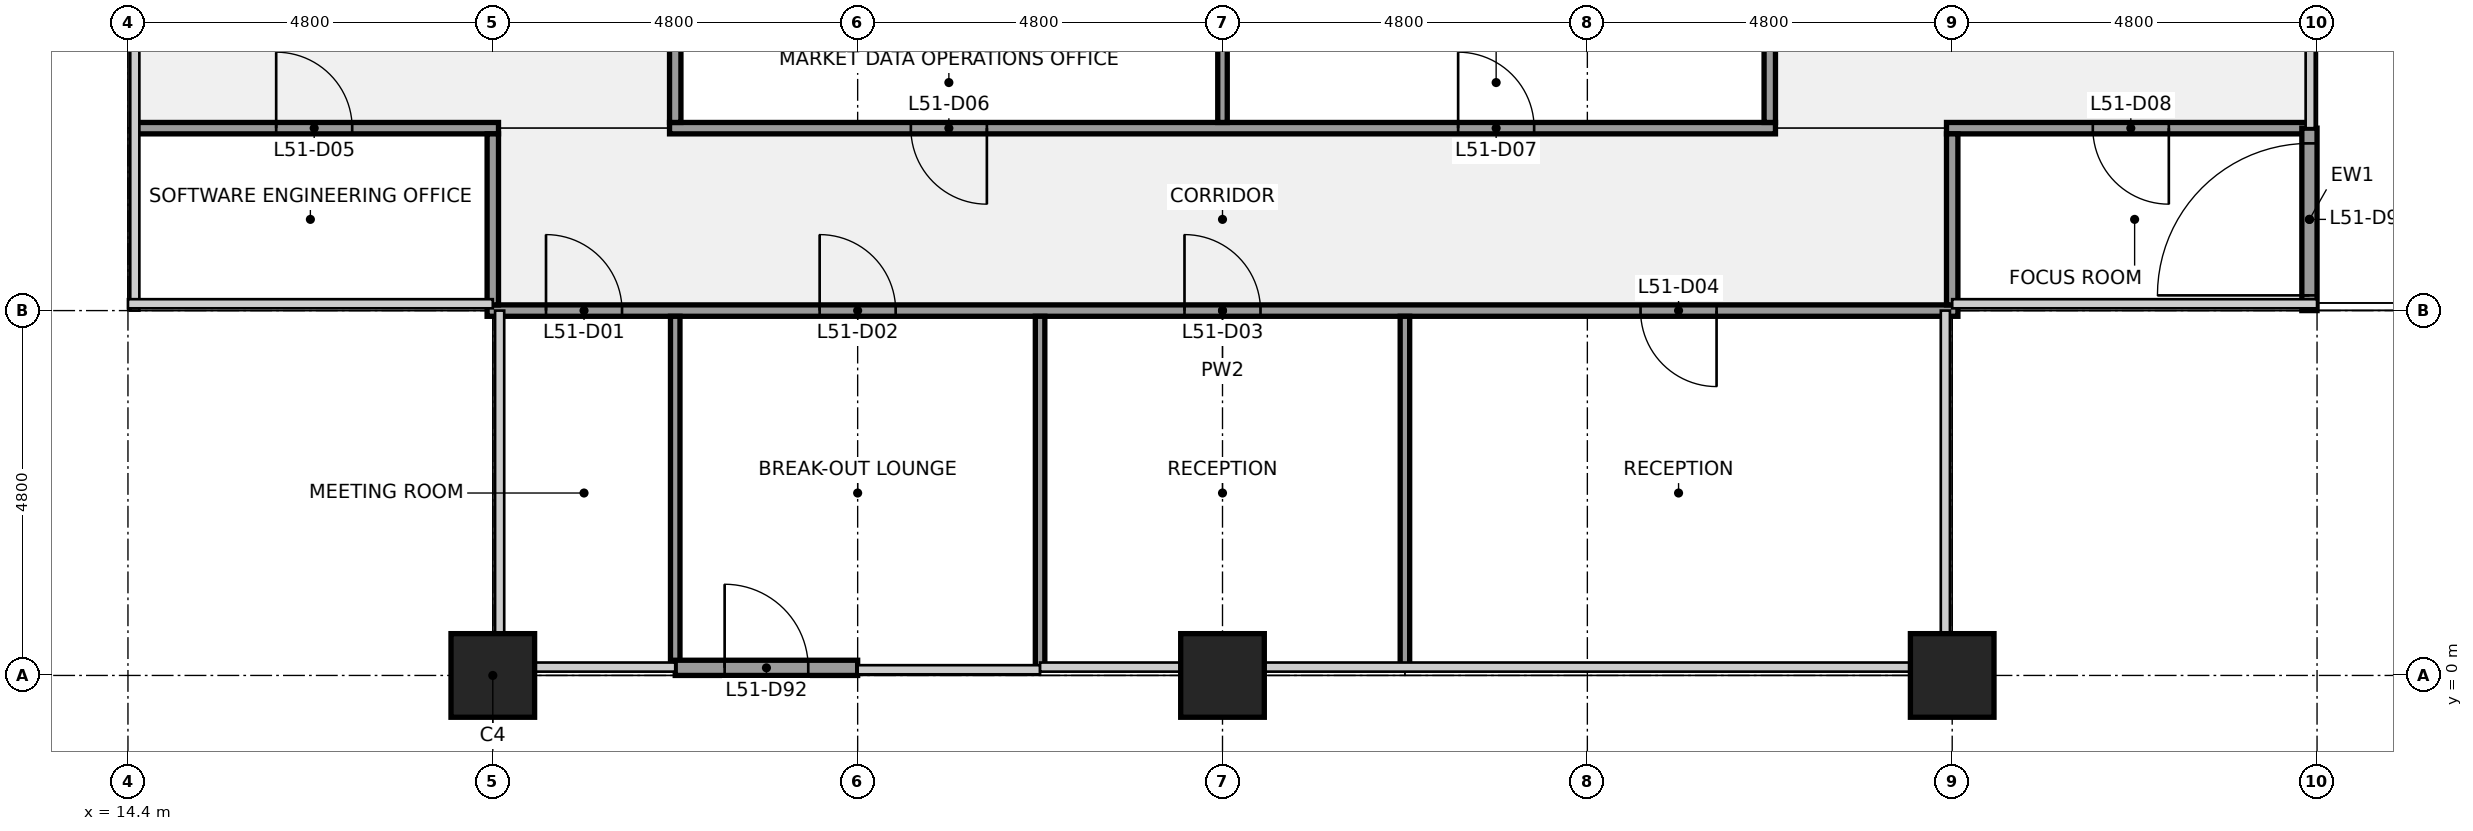
"""IFC4 building model, lengths in metres.
Left out: names, types, materials, properties, quantities, classifications, styles, units other than length and angle.
Written with IfcOpenShell. Run it as: python <this file> out.ifc"""

import sys

from ifc_helpers import new_model, si_unit, direction, frame, frame_2d, origin, origin_2d, place, context, subcontext, project, spatial, rectangle, extrude, element, fill, save


model = new_model("IFC4")
c1 = context("Model", 3, precision=1e-05, world=origin(), true_north=direction((0.0, 1.0)))
c2 = subcontext(c1, "Body", "Model", "MODEL_VIEW")
j1 = project(units=[si_unit("LENGTHUNIT", "METRE"), si_unit("PLANEANGLEUNIT", "RADIAN")], contexts=[c1])
p1 = place(None, origin())
s1 = spatial("IfcSite", under=j1, at=p1, CompositionType="ELEMENT")
p2 = place(p1, origin())
s2 = spatial("IfcBuilding", under=s1, at=p2, CompositionType="ELEMENT")
p3 = place(p2, frame((0.0, 0.0, 233.2)))
s3 = spatial("IfcBuildingStorey", under=s2, at=p3, CompositionType="ELEMENT", Elevation=233.2)
for number, where, z_axis, x_axis in (
    (1, (19.2, 0.0, 0.0), (0.0, 0.0, 1.0), (1.0, 0.0, 0.0)),
    (2, (28.8, 0.0, 0.0), (0.0, 0.0, 1.0), (1.0, 0.0, 0.0)),
    (3, (38.4, 0.0, 0.0), (0.0, 0.0, 1.0), (1.0, 0.0, 0.0)),
):
    element("IfcColumn", number, at=place(p3, frame(where, z_axis=z_axis, x_axis=x_axis)), inside=s3, PredefinedType="COLUMN", context=c2, shape_type="SweptSolid", body=[
        extrude(rectangle(XDim=1.1, YDim=1.1, at=origin_2d()), origin(), (0.0, 0.0, 1.0), 4.0),
    ])
p4 = place(p3, frame((19.125, 4.8, 0.0), z_axis=(0.0, 0.0, 1.0), x_axis=(1.0, 0.0, 0.0)))
e4 = element("IfcWall", 4, at=p4, inside=s3, PredefinedType="PARTITIONING", context=c2, shape_type="SweptSolid", body=[
    extrude(rectangle(XDim=19.35, YDim=0.15, at=frame_2d((9.675, 0.0))), origin(), (0.0, 0.0, 1.0), 2.87),
])
p5 = place(p4, frame((0.775, 0.0, 0.0)))
e5 = element("IfcOpeningElement", 5, at=p5, cuts=e4, PredefinedType="OPENING", context=c2, shape_type="SweptSolid", body=[
    extrude(rectangle(XDim=1.0, YDim=2.1, at=frame_2d((0.5, 1.05))), frame((0.0, 0.085, 0.0), z_axis=(0.0, -1.0, 0.0), x_axis=(1.0, 0.0, 0.0)), (0.0, 0.0, 1.0), 0.17),
])
p6 = place(p4, frame((4.375, 0.0, 0.0)))
e6 = element("IfcOpeningElement", 6, at=p6, cuts=e4, PredefinedType="OPENING", context=c2, shape_type="SweptSolid", body=[
    extrude(rectangle(XDim=1.0, YDim=2.1, at=frame_2d((0.5, 1.05))), frame((0.0, 0.085, 0.0), z_axis=(0.0, -1.0, 0.0), x_axis=(1.0, 0.0, 0.0)), (0.0, 0.0, 1.0), 0.17),
])
p7 = place(p4, frame((9.175, 0.0, 0.0)))
e7 = element("IfcOpeningElement", 7, at=p7, cuts=e4, PredefinedType="OPENING", context=c2, shape_type="SweptSolid", body=[
    extrude(rectangle(XDim=1.0, YDim=2.1, at=frame_2d((0.5, 1.05))), frame((0.0, 0.085, 0.0), z_axis=(0.0, -1.0, 0.0), x_axis=(1.0, 0.0, 0.0)), (0.0, 0.0, 1.0), 0.17),
])
p8 = place(p4, frame((15.175, 0.0, 0.0)))
e8 = element("IfcOpeningElement", 8, at=p8, cuts=e4, PredefinedType="OPENING", context=c2, shape_type="SweptSolid", body=[
    extrude(rectangle(XDim=1.0, YDim=2.1, at=frame_2d((0.5, 1.05))), frame((0.0, 0.085, 0.0), z_axis=(0.0, -1.0, 0.0), x_axis=(1.0, 0.0, 0.0)), (0.0, 0.0, 1.0), 0.17),
])
p9 = place(p3, frame((14.5, 7.2, 0.0), z_axis=(0.0, 0.0, 1.0), x_axis=(1.0, 0.0, 0.0)))
e9 = element("IfcWall", 9, at=p9, inside=s3, PredefinedType="PARTITIONING", context=c2, shape_type="SweptSolid", body=[
    extrude(rectangle(XDim=4.775, YDim=0.15, at=frame_2d((2.387, 0.0))), origin(), (0.0, 0.0, 1.0), 2.87),
])
p10 = place(p9, frame((1.85, 0.0, 0.0)))
e10 = element("IfcOpeningElement", 10, at=p10, cuts=e9, PredefinedType="OPENING", context=c2, shape_type="SweptSolid", body=[
    extrude(rectangle(XDim=1.0, YDim=2.1, at=frame_2d((0.5, 1.05))), frame((0.0, 0.085, 0.0), z_axis=(0.0, -1.0, 0.0), x_axis=(1.0, 0.0, 0.0)), (0.0, 0.0, 1.0), 0.17),
])
p11 = place(p3, frame((21.525, 7.2, 0.0), z_axis=(0.0, 0.0, 1.0), x_axis=(1.0, 0.0, 0.0)))
e11 = element("IfcWall", 11, at=p11, inside=s3, PredefinedType="PARTITIONING", context=c2, shape_type="SweptSolid", body=[
    extrude(rectangle(XDim=14.55, YDim=0.15, at=frame_2d((7.275, 0.0))), origin(), (0.0, 0.0, 1.0), 2.87),
])
p12 = place(p11, frame((3.175, 0.0, 0.0)))
e12 = element("IfcOpeningElement", 12, at=p12, cuts=e11, PredefinedType="OPENING", context=c2, shape_type="SweptSolid", body=[
    extrude(rectangle(XDim=1.0, YDim=2.1, at=frame_2d((0.5, 1.05))), frame((0.0, 0.085, 0.0), z_axis=(0.0, -1.0, 0.0), x_axis=(1.0, 0.0, 0.0)), (0.0, 0.0, 1.0), 0.17),
])
p13 = place(p11, frame((10.375, 0.0, 0.0)))
e13 = element("IfcOpeningElement", 13, at=p13, cuts=e11, PredefinedType="OPENING", context=c2, shape_type="SweptSolid", body=[
    extrude(rectangle(XDim=1.0, YDim=2.1, at=frame_2d((0.5, 1.05))), frame((0.0, 0.085, 0.0), z_axis=(0.0, -1.0, 0.0), x_axis=(1.0, 0.0, 0.0)), (0.0, 0.0, 1.0), 0.17),
])
p14 = place(p3, frame((38.325, 7.2, 0.0), z_axis=(0.0, 0.0, 1.0), x_axis=(1.0, 0.0, 0.0)))
e14 = element("IfcWall", 14, at=p14, inside=s3, PredefinedType="PARTITIONING", context=c2, shape_type="SweptSolid", body=[
    extrude(rectangle(XDim=4.775, YDim=0.15, at=frame_2d((2.388, 0.0))), origin(), (0.0, 0.0, 1.0), 2.87),
])
p15 = place(p14, frame((1.925, 0.0, 0.0)))
e15 = element("IfcOpeningElement", 15, at=p15, cuts=e14, PredefinedType="OPENING", context=c2, shape_type="SweptSolid", body=[
    extrude(rectangle(XDim=1.0, YDim=2.1, at=frame_2d((0.5, 1.05))), frame((0.0, 0.085, 0.0), z_axis=(0.0, -1.0, 0.0), x_axis=(1.0, 0.0, 0.0)), (0.0, 0.0, 1.0), 0.17),
])
p16 = place(p3, frame((19.2, 4.875, 0.0), z_axis=(0.0, 0.0, 1.0), x_axis=(0.0, 1.0, 0.0)))
e16 = element("IfcWall", 16, at=p16, inside=s3, PredefinedType="PARTITIONING", context=c2, shape_type="SweptSolid", body=[
    extrude(rectangle(XDim=2.25, YDim=0.15, at=frame_2d((1.125, 0.0))), origin(), (0.0, 0.0, 1.0), 2.87),
])
p17 = place(p3, frame((21.6, 0.1, 0.0), z_axis=(0.0, 0.0, 1.0), x_axis=(0.0, 1.0, 0.0)))
e17 = element("IfcWall", 17, at=p17, inside=s3, PredefinedType="PARTITIONING", context=c2, shape_type="SweptSolid", body=[
    extrude(rectangle(XDim=4.625, YDim=0.125, at=frame_2d((2.312, 0.0))), origin(), (0.0, 0.0, 1.0), 2.87),
])
p18 = place(p3, frame((21.6, 7.275, 0.0), z_axis=(0.0, 0.0, 1.0), x_axis=(0.0, 1.0, 0.0)))
e18 = element("IfcWall", 18, at=p18, inside=s3, PredefinedType="PARTITIONING", context=c2, shape_type="SweptSolid", body=[
    extrude(rectangle(XDim=1.062, YDim=0.15, at=frame_2d((0.531, 0.0))), origin(), (0.0, 0.0, 1.0), 2.87),
])
p19 = place(p3, frame((26.4, 0.1, 0.0), z_axis=(0.0, 0.0, 1.0), x_axis=(0.0, 1.0, 0.0)))
e19 = element("IfcWall", 19, at=p19, inside=s3, PredefinedType="PARTITIONING", context=c2, shape_type="SweptSolid", body=[
    extrude(rectangle(XDim=4.625, YDim=0.125, at=frame_2d((2.312, 0.0))), origin(), (0.0, 0.0, 1.0), 2.87),
])
p20 = place(p3, frame((28.8, 7.275, 0.0), z_axis=(0.0, 0.0, 1.0), x_axis=(0.0, 1.0, 0.0)))
e20 = element("IfcWall", 20, at=p20, inside=s3, PredefinedType="PARTITIONING", context=c2, shape_type="SweptSolid", body=[
    extrude(rectangle(XDim=1.062, YDim=0.125, at=frame_2d((0.531, 0.0))), origin(), (0.0, 0.0, 1.0), 2.87),
])
p21 = place(p3, frame((31.2, 0.1, 0.0), z_axis=(0.0, 0.0, 1.0), x_axis=(0.0, 1.0, 0.0)))
e21 = element("IfcWall", 21, at=p21, inside=s3, PredefinedType="PARTITIONING", context=c2, shape_type="SweptSolid", body=[
    extrude(rectangle(XDim=4.625, YDim=0.125, at=frame_2d((2.312, 0.0))), origin(), (0.0, 0.0, 1.0), 2.87),
])
p22 = place(p3, frame((36.0, 7.275, 0.0), z_axis=(0.0, 0.0, 1.0), x_axis=(0.0, 1.0, 0.0)))
e22 = element("IfcWall", 22, at=p22, inside=s3, PredefinedType="PARTITIONING", context=c2, shape_type="SweptSolid", body=[
    extrude(rectangle(XDim=1.062, YDim=0.15, at=frame_2d((0.531, 0.0))), origin(), (0.0, 0.0, 1.0), 2.87),
])
p23 = place(p3, frame((38.4, 4.875, 0.0), z_axis=(0.0, 0.0, 1.0), x_axis=(0.0, 1.0, 0.0)))
e23 = element("IfcWall", 23, at=p23, inside=s3, PredefinedType="PARTITIONING", context=c2, shape_type="SweptSolid", body=[
    extrude(rectangle(XDim=2.25, YDim=0.15, at=frame_2d((1.125, 0.0))), origin(), (0.0, 0.0, 1.0), 2.87),
])
p24 = place(p3, frame((21.6, 0.1, 0.0), z_axis=(0.0, 0.0, 1.0), x_axis=(1.0, 0.0, 0.0)))
e24 = element("IfcWall", 24, at=p24, inside=s3, PredefinedType="SOLIDWALL", context=c2, shape_type="SweptSolid", body=[
    extrude(rectangle(XDim=2.4, YDim=0.2, at=frame_2d((1.2, 0.0))), origin(), (0.0, 0.0, 1.0), 3.314),
])
p25 = place(p24, frame((0.65, 0.0, 0.0)))
e25 = element("IfcOpeningElement", 25, at=p25, cuts=e24, PredefinedType="OPENING", context=c2, shape_type="SweptSolid", body=[
    extrude(rectangle(XDim=1.1, YDim=2.1, at=frame_2d((0.55, 1.05))), frame((0.0, 0.11, 0.0), z_axis=(0.0, -1.0, 0.0), x_axis=(1.0, 0.0, 0.0)), (0.0, 0.0, 1.0), 0.22),
])
p26 = place(p3, frame((43.1, 4.8, 0.0), z_axis=(0.0, 0.0, 1.0), x_axis=(0.0, 1.0, 0.0)))
e26 = element("IfcWall", 26, at=p26, inside=s3, PredefinedType="SOLIDWALL", context=c2, shape_type="SweptSolid", body=[
    extrude(rectangle(XDim=2.4, YDim=0.2, at=frame_2d((1.2, 0.0))), origin(), (0.0, 0.0, 1.0), 3.296),
])
p27 = place(p26, frame((0.2, 0.0, 0.0)))
e27 = element("IfcOpeningElement", 27, at=p27, cuts=e26, PredefinedType="OPENING", context=c2, shape_type="SweptSolid", body=[
    extrude(rectangle(XDim=2.0, YDim=2.1, at=frame_2d((1.0, 1.05))), frame((0.0, 0.11, 0.0), z_axis=(0.0, -1.0, 0.0), x_axis=(1.0, 0.0, 0.0)), (0.0, 0.0, 1.0), 0.22),
])
for number, where, z_axis, x_axis in (
    (28, (19.2, -1.025, 0.0), (0.0, 0.0, 1.0), (1.0, 0.0, 0.0)),
    (29, (38.4, -1.025, 0.0), (0.0, 0.0, 1.0), (1.0, 0.0, 0.0)),
):
    element("IfcColumn", number, at=place(p3, frame(where, z_axis=z_axis, x_axis=x_axis)), inside=s3, PredefinedType="PILASTER", context=c2, shape_type="SweptSolid", body=[
        extrude(rectangle(XDim=2.4, YDim=0.95, at=origin_2d()), origin(), (0.0, 0.0, 1.0), 4.0),
    ])
p28 = place(p5, origin())
e30 = element("IfcDoor", 30, at=p28, inside=s3, OperationType="SINGLE_SWING_LEFT", PredefinedType="DOOR", context=c2, shape_type="SweptSolid", body=[
    extrude(rectangle(XDim=1.0, YDim=2.1, at=frame_2d((0.5, 1.05))), frame((0.0, 0.025, 0.0), z_axis=(0.0, -1.0, 0.0), x_axis=(1.0, 0.0, 0.0)), (0.0, 0.0, 1.0), 0.05),
])
fill(e5, e30)
p29 = place(p6, origin())
e31 = element("IfcDoor", 31, at=p29, inside=s3, OperationType="SINGLE_SWING_LEFT", PredefinedType="DOOR", context=c2, shape_type="SweptSolid", body=[
    extrude(rectangle(XDim=1.0, YDim=2.1, at=frame_2d((0.5, 1.05))), frame((0.0, 0.025, 0.0), z_axis=(0.0, -1.0, 0.0), x_axis=(1.0, 0.0, 0.0)), (0.0, 0.0, 1.0), 0.05),
])
fill(e6, e31)
p30 = place(p7, origin())
e32 = element("IfcDoor", 32, at=p30, inside=s3, OperationType="SINGLE_SWING_LEFT", PredefinedType="DOOR", context=c2, shape_type="SweptSolid", body=[
    extrude(rectangle(XDim=1.0, YDim=2.1, at=frame_2d((0.5, 1.05))), frame((0.0, 0.025, 0.0), z_axis=(0.0, -1.0, 0.0), x_axis=(1.0, 0.0, 0.0)), (0.0, 0.0, 1.0), 0.05),
])
fill(e7, e32)
p31 = place(p8, origin())
e33 = element("IfcDoor", 33, at=p31, inside=s3, OperationType="SINGLE_SWING_RIGHT", PredefinedType="DOOR", context=c2, shape_type="SweptSolid", body=[
    extrude(rectangle(XDim=1.0, YDim=2.1, at=frame_2d((0.5, 1.05))), frame((0.0, 0.025, 0.0), z_axis=(0.0, -1.0, 0.0), x_axis=(1.0, 0.0, 0.0)), (0.0, 0.0, 1.0), 0.05),
])
fill(e8, e33)
p32 = place(p10, origin())
e34 = element("IfcDoor", 34, at=p32, inside=s3, OperationType="SINGLE_SWING_LEFT", PredefinedType="DOOR", context=c2, shape_type="SweptSolid", body=[
    extrude(rectangle(XDim=1.0, YDim=2.1, at=frame_2d((0.5, 1.05))), frame((0.0, 0.025, 0.0), z_axis=(0.0, -1.0, 0.0), x_axis=(1.0, 0.0, 0.0)), (0.0, 0.0, 1.0), 0.05),
])
fill(e10, e34)
p33 = place(p12, origin())
e35 = element("IfcDoor", 35, at=p33, inside=s3, OperationType="SINGLE_SWING_RIGHT", PredefinedType="DOOR", context=c2, shape_type="SweptSolid", body=[
    extrude(rectangle(XDim=1.0, YDim=2.1, at=frame_2d((0.5, 1.05))), frame((0.0, 0.025, 0.0), z_axis=(0.0, -1.0, 0.0), x_axis=(1.0, 0.0, 0.0)), (0.0, 0.0, 1.0), 0.05),
])
fill(e12, e35)
p34 = place(p13, origin())
e36 = element("IfcDoor", 36, at=p34, inside=s3, OperationType="SINGLE_SWING_LEFT", PredefinedType="DOOR", context=c2, shape_type="SweptSolid", body=[
    extrude(rectangle(XDim=1.0, YDim=2.1, at=frame_2d((0.5, 1.05))), frame((0.0, 0.025, 0.0), z_axis=(0.0, -1.0, 0.0), x_axis=(1.0, 0.0, 0.0)), (0.0, 0.0, 1.0), 0.05),
])
fill(e13, e36)
p35 = place(p15, origin())
e37 = element("IfcDoor", 37, at=p35, inside=s3, OperationType="SINGLE_SWING_RIGHT", PredefinedType="DOOR", context=c2, shape_type="SweptSolid", body=[
    extrude(rectangle(XDim=1.0, YDim=2.1, at=frame_2d((0.5, 1.05))), frame((0.0, 0.025, 0.0), z_axis=(0.0, -1.0, 0.0), x_axis=(1.0, 0.0, 0.0)), (0.0, 0.0, 1.0), 0.05),
])
fill(e15, e37)
p36 = place(p25, origin())
e38 = element("IfcDoor", 38, at=p36, inside=s3, OperationType="SINGLE_SWING_LEFT", PredefinedType="DOOR", context=c2, shape_type="SweptSolid", body=[
    extrude(rectangle(XDim=1.1, YDim=2.1, at=frame_2d((0.55, 1.05))), frame((0.0, 0.025, 0.0), z_axis=(0.0, -1.0, 0.0), x_axis=(1.0, 0.0, 0.0)), (0.0, 0.0, 1.0), 0.05),
])
fill(e25, e38)
p37 = place(p27, origin())
e39 = element("IfcDoor", 39, at=p37, inside=s3, OperationType="SINGLE_SWING_LEFT", PredefinedType="DOOR", context=c2, shape_type="SweptSolid", body=[
    extrude(rectangle(XDim=2.0, YDim=2.1, at=frame_2d((1.0, 1.05))), frame((0.0, 0.025, 0.0), z_axis=(0.0, -1.0, 0.0), x_axis=(1.0, 0.0, 0.0)), (0.0, 0.0, 1.0), 0.05),
])
fill(e27, e39)
save(model, sys.argv[1])
